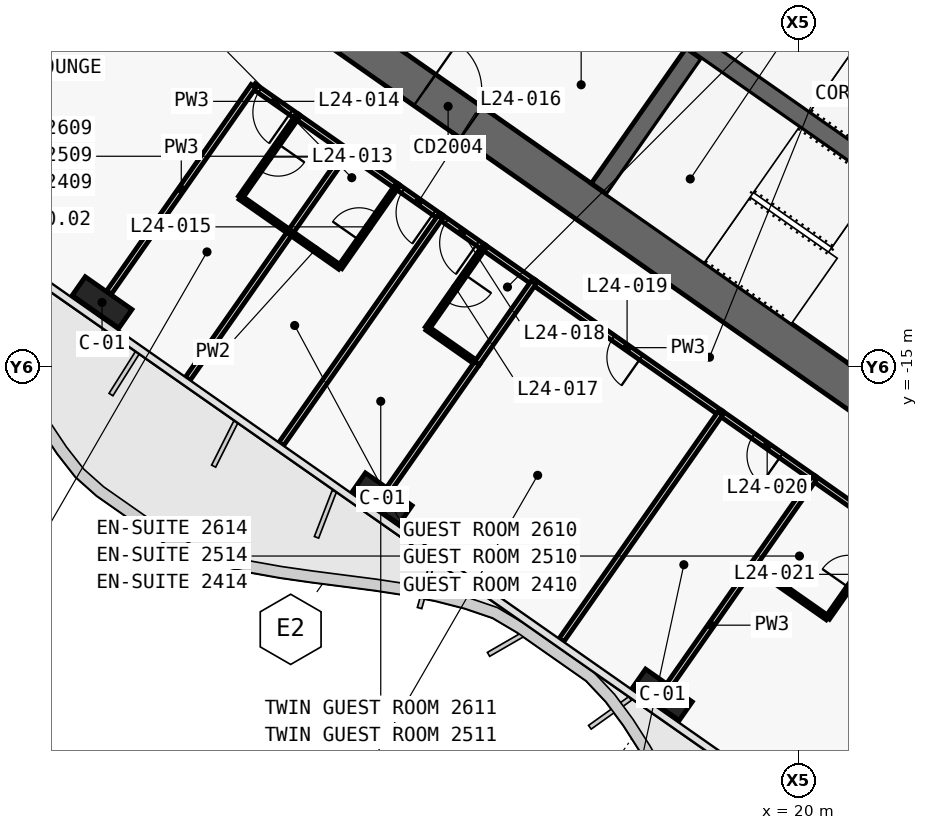
"""IFC4 building model, lengths in metres.
Left out: names, types, materials, properties, quantities, classifications, styles, units other than length and angle.
Written with IfcOpenShell. Run it as: python <this file> out.ifc"""

import sys

from ifc_helpers import new_model, si_unit, direction, frame, frame_2d, origin, origin_2d, place, context, subcontext, project, spatial, polyline, rectangle, outline, extrude, element, fill, save


model = new_model("IFC4")
c1 = context("Model", 3, precision=1e-05, world=origin(), true_north=direction((0.0, 1.0)))
c2 = subcontext(c1, "Body", "Model", "MODEL_VIEW")
j1 = project(units=[si_unit("LENGTHUNIT", "METRE"), si_unit("PLANEANGLEUNIT", "RADIAN")], contexts=[c1])
p1 = place(None, origin())
s1 = spatial("IfcSite", under=j1, at=p1, CompositionType="ELEMENT")
p2 = place(p1, origin())
s2 = spatial("IfcBuilding", under=s1, at=p2, CompositionType="ELEMENT")
p3 = place(p2, frame((0.0, 0.0, 112.1)))
s3 = spatial("IfcBuildingStorey", under=s2, at=p3, CompositionType="ELEMENT", Elevation=112.1)
p4 = place(p3, frame((-0.037, 11.867, 0.0), z_axis=(0.0, 0.0, 1.0), x_axis=(0.819155306259, -0.573571777746, 0.0)))
e1 = element("IfcWall", 1, at=p4, inside=s3, PredefinedType="SHEAR", context=c2, shape_type="SweptSolid", body=[
    extrude(outline(polyline([(33.837, 0.5), (0.0, 0.5), (0.7, -0.5), (33.837, -0.5), (33.837, 0.5)])), origin(), (0.0, 0.0, 1.0), 3.6),
])
p5 = place(p3, frame((-0.037, -0.585, 0.0), z_axis=(0.0, 0.0, 1.0), x_axis=(0.819157152511, -0.573569140985, 0.0)))
e2 = element("IfcWall", 2, at=p5, inside=s3, PredefinedType="SHEAR", context=c2, shape_type="SweptSolid", body=[
    extrude(outline(polyline([(26.695, 0.5), (0.0, 0.5), (0.7, -0.5), (26.695, -0.5), (26.695, 0.5)])), origin(), (0.0, 0.0, 1.0), 3.6),
])
p6 = place(p5, frame((6.695, 0.0, 0.0)))
e3 = element("IfcOpeningElement", 3, at=p6, cuts=e2, PredefinedType="OPENING", context=c2, shape_type="SweptSolid", body=[
    extrude(rectangle(XDim=1.5, YDim=2.1, at=frame_2d((0.75, 1.05))), frame((0.0, 0.51, 0.0), z_axis=(0.0, -1.0, 0.0), x_axis=(1.0, 0.0, 0.0)), (0.0, 0.0, 1.0), 1.02),
])
p7 = place(p5, frame((12.445, 0.0, 0.0)))
e4 = element("IfcOpeningElement", 4, at=p7, cuts=e2, PredefinedType="OPENING", context=c2, shape_type="SweptSolid", body=[
    extrude(rectangle(XDim=1.5, YDim=2.1, at=frame_2d((0.75, 1.05))), frame((0.0, 0.51, 0.0), z_axis=(0.0, -1.0, 0.0), x_axis=(1.0, 0.0, 0.0)), (0.0, 0.0, 1.0), 1.02),
])
p8 = place(p3, frame((14.745, -10.324, 0.0), z_axis=(0.0, 0.0, 1.0), x_axis=(0.57356780395, 0.819158088694, 0.0)))
e5 = element("IfcWall", 5, at=p8, inside=s3, PredefinedType="SHEAR", context=c2, shape_type="SweptSolid", body=[
    extrude(outline(polyline([(0.0, 0.25), (0.0, -0.25), (4.35, -0.25), (4.35, 0.25), (0.0, 0.25)])), origin(), (0.0, 0.0, 1.0), 3.6),
])
p9 = place(p3, frame((2.638, 3.768, 0.0), z_axis=(0.0, 0.0, 1.0), x_axis=(0.819148977158, -0.573580816643, 0.0)))
e6 = element("IfcWall", 6, at=p9, inside=s3, PredefinedType="SHEAR", context=c2, shape_type="SweptSolid", body=[
    extrude(outline(polyline([(0.0, 0.25), (0.0, -0.25), (26.0, -0.25), (26.0, 0.25), (0.0, 0.25)])), origin(), (0.0, 0.0, 1.0), 3.6),
])
p10 = place(p9, frame((9.637, 0.0, 0.0)))
e7 = element("IfcOpeningElement", 7, at=p10, cuts=e6, PredefinedType="OPENING", context=c2, shape_type="SweptSolid", body=[
    extrude(rectangle(XDim=1.2, YDim=2.1, at=frame_2d((0.6, 1.05))), frame((0.0, 0.26, 0.0), z_axis=(0.0, -1.0, 0.0), x_axis=(1.0, 0.0, 0.0)), (0.0, 0.0, 1.0), 0.52),
])
p11 = place(p9, frame((11.812, 0.0, 0.0)))
e8 = element("IfcOpeningElement", 8, at=p11, cuts=e6, PredefinedType="OPENING", context=c2, shape_type="SweptSolid", body=[
    extrude(rectangle(XDim=1.2, YDim=2.1, at=frame_2d((0.6, 1.05))), frame((0.0, 0.26, 0.0), z_axis=(0.0, -1.0, 0.0), x_axis=(1.0, 0.0, 0.0)), (0.0, 0.0, 1.0), 0.52),
])
p12 = place(p9, frame((13.988, 0.0, 0.0)))
e9 = element("IfcOpeningElement", 9, at=p12, cuts=e6, PredefinedType="OPENING", context=c2, shape_type="SweptSolid", body=[
    extrude(rectangle(XDim=1.2, YDim=2.1, at=frame_2d((0.6, 1.05))), frame((0.0, 0.26, 0.0), z_axis=(0.0, -1.0, 0.0), x_axis=(1.0, 0.0, 0.0)), (0.0, 0.0, 1.0), 0.52),
])
p13 = place(p9, frame((16.262, 0.0, 0.0)))
e10 = element("IfcOpeningElement", 10, at=p13, cuts=e6, PredefinedType="OPENING", context=c2, shape_type="SweptSolid", body=[
    extrude(rectangle(XDim=1.0, YDim=2.1, at=frame_2d((0.5, 1.05))), frame((0.0, 0.26, 0.0), z_axis=(0.0, -1.0, 0.0), x_axis=(1.0, 0.0, 0.0)), (0.0, 0.0, 1.0), 0.52),
])
for number, where, z_axis, x_axis in (
    (11, (1.665, -13.313, 0.0), (0.0, 0.0, 1.0), (0.819, -0.574, 0.0)),
    (12, (9.038, -18.475, 0.0), (0.0, 0.0, 1.0), (0.819, -0.574, 0.0)),
    (13, (16.41, -23.637, 0.0), (0.0, 0.0, 1.0), (0.819, -0.574, 0.0)),
):
    element("IfcColumn", number, at=place(p3, frame(where, z_axis=z_axis, x_axis=x_axis)), inside=s3, PredefinedType="COLUMN", context=c2, shape_type="SweptSolid", body=[
        extrude(rectangle(XDim=1.5, YDim=0.6, at=origin_2d()), origin(), (0.0, 0.0, 1.0), 3.6),
    ])
p14 = place(p3, frame((6.799, -8.423, 0.0), z_axis=(0.0, 0.0, 1.0), x_axis=(-0.819207359301, 0.573497430219, 0.0)))
e14 = element("IfcWall", 14, at=p14, inside=s3, PredefinedType="PARTITIONING", context=c2, shape_type="SweptSolid", body=[
    extrude(rectangle(XDim=1.401, YDim=0.15, at=frame_2d((0.7, 0.0))), origin(), (0.0, 0.0, 1.0), 2.6),
])
p15 = place(p14, frame((0.201, 0.0, 0.0)))
e15 = element("IfcOpeningElement", 15, at=p15, cuts=e14, PredefinedType="OPENING", context=c2, shape_type="SweptSolid", body=[
    extrude(rectangle(XDim=1.0, YDim=2.1, at=frame_2d((0.5, 1.05))), frame((0.0, 0.085, 0.0), z_axis=(0.0, -1.0, 0.0), x_axis=(1.0, 0.0, 0.0)), (0.0, 0.0, 1.0), 0.17),
])
p16 = place(p3, frame((8.111, -9.342, 0.0), z_axis=(0.0, 0.0, 1.0), x_axis=(-0.8190674132, 0.573697283098, 0.0)))
e16 = element("IfcWall", 16, at=p16, inside=s3, PredefinedType="PARTITIONING", context=c2, shape_type="SweptSolid", body=[
    extrude(rectangle(XDim=1.604, YDim=0.15, at=frame_2d((0.802, 0.0))), origin(), (0.0, 0.0, 1.0), 3.32),
])
p17 = place(p3, frame((10.568, -11.062, 0.0), z_axis=(0.0, 0.0, 1.0), x_axis=(-0.81914197737, 0.573590813132, 0.0)))
e17 = element("IfcWall", 17, at=p17, inside=s3, PredefinedType="PARTITIONING", context=c2, shape_type="SweptSolid", body=[
    extrude(rectangle(XDim=1.403, YDim=0.15, at=frame_2d((0.701, 0.0))), origin(), (0.0, 0.0, 1.0), 3.32),
])
p18 = place(p17, frame((0.202, 0.0, 0.0)))
e18 = element("IfcOpeningElement", 18, at=p18, cuts=e17, PredefinedType="OPENING", context=c2, shape_type="SweptSolid", body=[
    extrude(rectangle(XDim=1.0, YDim=2.1, at=frame_2d((0.5, 1.05))), frame((0.0, 0.085, 0.0), z_axis=(0.0, -1.0, 0.0), x_axis=(1.0, 0.0, 0.0)), (0.0, 0.0, 1.0), 0.17),
])
p19 = place(p3, frame((9.421, -10.259, 0.0), z_axis=(0.0, 0.0, 1.0), x_axis=(-0.819117502046, 0.573625764625, 0.0)))
e19 = element("IfcWall", 19, at=p19, inside=s3, PredefinedType="PARTITIONING", context=c2, shape_type="SweptSolid", body=[
    extrude(rectangle(XDim=1.604, YDim=0.15, at=frame_2d((0.802, 0.0))), origin(), (0.0, 0.0, 1.0), 3.32),
])
p20 = place(p3, frame((11.714, -11.865, 0.0), z_axis=(0.0, 0.0, 1.0), x_axis=(-0.81914197737, 0.573590813132, 0.0)))
e20 = element("IfcWall", 20, at=p20, inside=s3, PredefinedType="PARTITIONING", context=c2, shape_type="SweptSolid", body=[
    extrude(rectangle(XDim=1.403, YDim=0.15, at=frame_2d((0.701, 0.0))), origin(), (0.0, 0.0, 1.0), 3.32),
])
p21 = place(p20, frame((0.201, 0.0, 0.0)))
e21 = element("IfcOpeningElement", 21, at=p21, cuts=e20, PredefinedType="OPENING", context=c2, shape_type="SweptSolid", body=[
    extrude(rectangle(XDim=1.0, YDim=2.1, at=frame_2d((0.5, 1.05))), frame((0.0, 0.085, 0.0), z_axis=(0.0, -1.0, 0.0), x_axis=(1.0, 0.0, 0.0)), (0.0, 0.0, 1.0), 0.17),
])
p22 = place(p3, frame((13.026, -12.783, 0.0), z_axis=(0.0, 0.0, 1.0), x_axis=(-0.819189013667, 0.573523634986, 0.0)))
e22 = element("IfcWall", 22, at=p22, inside=s3, PredefinedType="PARTITIONING", context=c2, shape_type="SweptSolid", body=[
    extrude(rectangle(XDim=1.604, YDim=0.15, at=frame_2d((0.802, 0.0))), origin(), (0.0, 0.0, 1.0), 2.6),
])
p23 = place(p3, frame((17.941, -16.224, 0.0), z_axis=(0.0, 0.0, 1.0), x_axis=(-0.819165052243, 0.573557858619, 0.0)))
e23 = element("IfcWall", 23, at=p23, inside=s3, PredefinedType="PARTITIONING", context=c2, shape_type="SweptSolid", body=[
    extrude(rectangle(XDim=6.004, YDim=0.15, at=frame_2d((3.002, 0.0))), origin(), (0.0, 0.0, 1.0), 2.6),
])
p24 = place(p23, frame((2.552, 0.0, 0.0)))
e24 = element("IfcOpeningElement", 24, at=p24, cuts=e23, PredefinedType="OPENING", context=c2, shape_type="SweptSolid", body=[
    extrude(rectangle(XDim=0.9, YDim=2.1, at=frame_2d((0.45, 1.05))), frame((0.0, 0.085, 0.0), z_axis=(0.0, -1.0, 0.0), x_axis=(1.0, 0.0, 0.0)), (0.0, 0.0, 1.0), 0.17),
])
p25 = place(p3, frame((20.398, -17.945, 0.0), z_axis=(0.0, 0.0, 1.0), x_axis=(-0.819128818764, 0.573609604409, 0.0)))
e25 = element("IfcWall", 25, at=p25, inside=s3, PredefinedType="PARTITIONING", context=c2, shape_type="SweptSolid", body=[
    extrude(rectangle(XDim=3.004, YDim=0.15, at=frame_2d((1.502, 0.0))), origin(), (0.0, 0.0, 1.0), 2.6),
])
p26 = place(p25, frame((1.052, 0.0, 0.0)))
e26 = element("IfcOpeningElement", 26, at=p26, cuts=e25, PredefinedType="OPENING", context=c2, shape_type="SweptSolid", body=[
    extrude(rectangle(XDim=0.9, YDim=2.1, at=frame_2d((0.45, 1.05))), frame((0.0, 0.085, 0.0), z_axis=(0.0, -1.0, 0.0), x_axis=(1.0, 0.0, 0.0)), (0.0, 0.0, 1.0), 0.17),
])
p27 = place(p3, frame((22.364, -19.322, 0.0), z_axis=(0.0, 0.0, 1.0), x_axis=(-0.819146032251, 0.573585022335, 0.0)))
e27 = element("IfcWall", 27, at=p27, inside=s3, PredefinedType="PARTITIONING", context=c2, shape_type="SweptSolid", body=[
    extrude(rectangle(XDim=2.404, YDim=0.15, at=frame_2d((1.202, 0.0))), origin(), (0.0, 0.0, 1.0), 2.6),
])
p28 = place(p3, frame((6.798, -8.422, 0.0), z_axis=(0.0, 0.0, 1.0), x_axis=(-0.573537965655, -0.819178980414, 0.0)))
e28 = element("IfcWall", 28, at=p28, inside=s3, PredefinedType="PARTITIONING", context=c2, shape_type="SweptSolid", body=[
    extrude(rectangle(XDim=2.6, YDim=0.12, at=frame_2d((1.3, 0.0))), origin(), (0.0, 0.0, 1.0), 3.32),
])
p29 = place(p28, frame((0.875, 0.0, 0.0)))
e29 = element("IfcOpeningElement", 29, at=p29, cuts=e28, PredefinedType="OPENING", context=c2, shape_type="SweptSolid", body=[
    extrude(rectangle(XDim=0.85, YDim=2.05, at=frame_2d((0.425, 1.025))), frame((0.0, 0.07, 0.0), z_axis=(0.0, -1.0, 0.0), x_axis=(1.0, 0.0, 0.0)), (0.0, 0.0, 1.0), 0.14),
])
p30 = place(p3, frame((5.307, -10.553, 0.0), z_axis=(0.0, 0.0, 1.0), x_axis=(0.819131543282, -0.57360571371, 0.0)))
e30 = element("IfcWall", 30, at=p30, inside=s3, PredefinedType="PARTITIONING", context=c2, shape_type="SweptSolid", body=[
    extrude(rectangle(XDim=1.6, YDim=0.12, at=frame_2d((0.8, 0.0))), origin(), (0.0, 0.0, 1.0), 3.32),
])
p31 = place(p3, frame((6.617, -11.471, 0.0), z_axis=(0.0, 0.0, 1.0), x_axis=(-0.573535567792, -0.819180659243, 0.0)))
e31 = element("IfcWall", 31, at=p31, inside=s3, PredefinedType="PARTITIONING", context=c2, shape_type="SweptSolid", body=[
    extrude(rectangle(XDim=4.699, YDim=0.15, at=frame_2d((2.35, 0.0))), origin(), (0.0, 0.0, 1.0), 2.5),
])
p32 = place(p3, frame((1.849, -13.051, 0.0), z_axis=(0.0, 0.0, 1.0), x_axis=(0.57357355307, 0.819154063177, 0.0)))
e32 = element("IfcWall", 32, at=p32, inside=s3, PredefinedType="PARTITIONING", context=c2, shape_type="SweptSolid", body=[
    extrude(rectangle(XDim=6.63, YDim=0.15, at=frame_2d((3.315, 0.0))), origin(), (0.0, 0.0, 1.0), 2.6),
])
p33 = place(p3, frame((8.109, -9.34, 0.0), z_axis=(0.0, 0.0, 1.0), x_axis=(-0.573537965655, -0.819178980414, 0.0)))
e33 = element("IfcWall", 33, at=p33, inside=s3, PredefinedType="PARTITIONING", context=c2, shape_type="SweptSolid", body=[
    extrude(rectangle(XDim=2.6, YDim=0.15, at=frame_2d((1.3, 0.0))), origin(), (0.0, 0.0, 1.0), 3.32),
])
p34 = place(p3, frame((6.617, -11.471, 0.0), z_axis=(0.0, 0.0, 1.0), x_axis=(0.81918174131, -0.573534022273, 0.0)))
e34 = element("IfcWall", 34, at=p34, inside=s3, PredefinedType="PARTITIONING", context=c2, shape_type="SweptSolid", body=[
    extrude(rectangle(XDim=1.6, YDim=0.12, at=frame_2d((0.8, 0.0))), origin(), (0.0, 0.0, 1.0), 3.32),
])
p35 = place(p3, frame((7.929, -12.388, 0.0), z_axis=(0.0, 0.0, 1.0), x_axis=(0.573645091666, 0.819103967032, 0.0)))
e35 = element("IfcWall", 35, at=p35, inside=s3, PredefinedType="PARTITIONING", context=c2, shape_type="SweptSolid", body=[
    extrude(rectangle(XDim=2.6, YDim=0.12, at=frame_2d((1.3, 0.0))), origin(), (0.0, 0.0, 1.0), 3.32),
])
p36 = place(p35, frame((0.875, 0.0, 0.0)))
e36 = element("IfcOpeningElement", 36, at=p36, cuts=e35, PredefinedType="OPENING", context=c2, shape_type="SweptSolid", body=[
    extrude(rectangle(XDim=0.85, YDim=2.05, at=frame_2d((0.425, 1.025))), frame((0.0, 0.07, 0.0), z_axis=(0.0, -1.0, 0.0), x_axis=(1.0, 0.0, 0.0)), (0.0, 0.0, 1.0), 0.14),
])
p37 = place(p3, frame((10.567, -11.061, 0.0), z_axis=(0.0, 0.0, 1.0), x_axis=(-0.573579051994, -0.81915021279, 0.0)))
e37 = element("IfcWall", 37, at=p37, inside=s3, PredefinedType="PARTITIONING", context=c2, shape_type="SweptSolid", body=[
    extrude(rectangle(XDim=7.3, YDim=0.15, at=frame_2d((3.65, 0.0))), origin(), (0.0, 0.0, 1.0), 2.5),
])
p38 = place(p3, frame((11.712, -11.864, 0.0), z_axis=(0.0, 0.0, 1.0), x_axis=(-0.573537965655, -0.819178980414, 0.0)))
e38 = element("IfcWall", 38, at=p38, inside=s3, PredefinedType="PARTITIONING", context=c2, shape_type="SweptSolid", body=[
    extrude(rectangle(XDim=2.6, YDim=0.12, at=frame_2d((1.3, 0.0))), origin(), (0.0, 0.0, 1.0), 3.32),
])
p39 = place(p38, frame((0.875, 0.0, 0.0)))
e39 = element("IfcOpeningElement", 39, at=p39, cuts=e38, PredefinedType="OPENING", context=c2, shape_type="SweptSolid", body=[
    extrude(rectangle(XDim=0.85, YDim=2.05, at=frame_2d((0.425, 1.025))), frame((0.0, 0.07, 0.0), z_axis=(0.0, -1.0, 0.0), x_axis=(1.0, 0.0, 0.0)), (0.0, 0.0, 1.0), 0.14),
])
p40 = place(p3, frame((10.221, -13.995, 0.0), z_axis=(0.0, 0.0, 1.0), x_axis=(0.819131543282, -0.57360571371, 0.0)))
e40 = element("IfcWall", 40, at=p40, inside=s3, PredefinedType="PARTITIONING", context=c2, shape_type="SweptSolid", body=[
    extrude(rectangle(XDim=1.6, YDim=0.12, at=frame_2d((0.8, 0.0))), origin(), (0.0, 0.0, 1.0), 2.6),
])
p41 = place(p3, frame((11.532, -14.912, 0.0), z_axis=(0.0, 0.0, 1.0), x_axis=(-0.573531477532, -0.819183522954, 0.0)))
e41 = element("IfcWall", 41, at=p41, inside=s3, PredefinedType="PARTITIONING", context=c2, shape_type="SweptSolid", body=[
    extrude(rectangle(XDim=4.029, YDim=0.15, at=frame_2d((2.015, 0.0))), origin(), (0.0, 0.0, 1.0), 2.6),
])
p42 = place(p3, frame((13.024, -12.782, 0.0), z_axis=(0.0, 0.0, 1.0), x_axis=(-0.573537965655, -0.819178980414, 0.0)))
e42 = element("IfcWall", 42, at=p42, inside=s3, PredefinedType="PARTITIONING", context=c2, shape_type="SweptSolid", body=[
    extrude(rectangle(XDim=2.6, YDim=0.15, at=frame_2d((1.3, 0.0))), origin(), (0.0, 0.0, 1.0), 2.6),
])
p43 = place(p3, frame((17.939, -16.223, 0.0), z_axis=(0.0, 0.0, 1.0), x_axis=(-0.573594765376, -0.819139209862, 0.0)))
e43 = element("IfcWall", 43, at=p43, inside=s3, PredefinedType="PARTITIONING", context=c2, shape_type="SweptSolid", body=[
    extrude(rectangle(XDim=7.3, YDim=0.15, at=frame_2d((3.65, 0.0))), origin(), (0.0, 0.0, 1.0), 2.5),
])
p44 = place(p3, frame((18.791, -20.237, 0.0), z_axis=(0.0, 0.0, 1.0), x_axis=(-0.57359919792, -0.819136105995, 0.0)))
e44 = element("IfcWall", 44, at=p44, inside=s3, PredefinedType="PARTITIONING", context=c2, shape_type="SweptSolid", body=[
    extrude(rectangle(XDim=3.831, YDim=0.15, at=frame_2d((1.916, 0.0))), origin(), (0.0, 0.0, 1.0), 2.6),
])
p45 = place(p3, frame((20.396, -17.944, 0.0), z_axis=(0.0, 0.0, 1.0), x_axis=(-0.573596837309, -0.819137759006, 0.0)))
e45 = element("IfcWall", 45, at=p45, inside=s3, PredefinedType="PARTITIONING", context=c2, shape_type="SweptSolid", body=[
    extrude(rectangle(XDim=2.802, YDim=0.15, at=frame_2d((1.401, 0.0))), origin(), (0.0, 0.0, 1.0), 2.6),
])
p46 = place(p3, frame((18.79, -20.239, 0.0), z_axis=(0.0, 0.0, 1.0), x_axis=(0.819188907105, -0.573523787192, 0.0)))
e46 = element("IfcWall", 46, at=p46, inside=s3, PredefinedType="PARTITIONING", context=c2, shape_type="SweptSolid", body=[
    extrude(rectangle(XDim=2.4, YDim=0.12, at=frame_2d((1.2, 0.0))), origin(), (0.0, 0.0, 1.0), 2.6),
])
p47 = place(p3, frame((20.757, -21.615, 0.0), z_axis=(0.0, 0.0, 1.0), x_axis=(0.57364959175, 0.819100815459, 0.0)))
e47 = element("IfcWall", 47, at=p47, inside=s3, PredefinedType="PARTITIONING", context=c2, shape_type="SweptSolid", body=[
    extrude(rectangle(XDim=2.8, YDim=0.12, at=frame_2d((1.4, 0.0))), origin(), (0.0, 0.0, 1.0), 3.32),
])
p48 = place(p47, frame((0.975, 0.0, 0.0)))
e48 = element("IfcOpeningElement", 48, at=p48, cuts=e47, PredefinedType="OPENING", context=c2, shape_type="SweptSolid", body=[
    extrude(rectangle(XDim=0.85, YDim=2.05, at=frame_2d((0.425, 1.025))), frame((0.0, 0.07, 0.0), z_axis=(0.0, -1.0, 0.0), x_axis=(1.0, 0.0, 0.0)), (0.0, 0.0, 1.0), 0.14),
])
p49 = place(p7, origin())
e49 = element("IfcDoor", 49, at=p49, inside=s3, OperationType="DOUBLE_DOOR_SINGLE_SWING", PredefinedType="DOOR", context=c2, shape_type="SweptSolid", body=[
    extrude(rectangle(XDim=1.5, YDim=2.1, at=frame_2d((0.75, 1.05))), frame((0.0, 0.025, 0.0), z_axis=(0.0, -1.0, 0.0), x_axis=(1.0, 0.0, 0.0)), (0.0, 0.0, 1.0), 0.05),
])
fill(e4, e49)
p50 = place(p29, origin())
e50 = element("IfcDoor", 50, at=p50, inside=s3, OperationType="SINGLE_SWING_RIGHT", PredefinedType="DOOR", context=c2, shape_type="SweptSolid", body=[
    extrude(rectangle(XDim=0.85, YDim=2.05, at=frame_2d((0.425, 1.025))), frame((0.0, 0.025, 0.0), z_axis=(0.0, -1.0, 0.0), x_axis=(1.0, 0.0, 0.0)), (0.0, 0.0, 1.0), 0.05),
])
fill(e29, e50)
p51 = place(p15, origin())
e51 = element("IfcDoor", 51, at=p51, inside=s3, OperationType="SINGLE_SWING_LEFT", PredefinedType="DOOR", context=c2, shape_type="SweptSolid", body=[
    extrude(rectangle(XDim=1.0, YDim=2.1, at=frame_2d((0.5, 1.05))), frame((0.0, 0.025, 0.0), z_axis=(0.0, -1.0, 0.0), x_axis=(1.0, 0.0, 0.0)), (0.0, 0.0, 1.0), 0.05),
])
fill(e15, e51)
p52 = place(p36, origin())
e52 = element("IfcDoor", 52, at=p52, inside=s3, OperationType="SINGLE_SWING_RIGHT", PredefinedType="DOOR", context=c2, shape_type="SweptSolid", body=[
    extrude(rectangle(XDim=0.85, YDim=2.05, at=frame_2d((0.425, 1.025))), frame((0.0, 0.025, 0.0), z_axis=(0.0, -1.0, 0.0), x_axis=(1.0, 0.0, 0.0)), (0.0, 0.0, 1.0), 0.05),
])
fill(e36, e52)
p53 = place(p18, origin())
e53 = element("IfcDoor", 53, at=p53, inside=s3, OperationType="SINGLE_SWING_LEFT", PredefinedType="DOOR", context=c2, shape_type="SweptSolid", body=[
    extrude(rectangle(XDim=1.0, YDim=2.1, at=frame_2d((0.5, 1.05))), frame((0.0, 0.025, 0.0), z_axis=(0.0, -1.0, 0.0), x_axis=(1.0, 0.0, 0.0)), (0.0, 0.0, 1.0), 0.05),
])
fill(e18, e53)
p54 = place(p39, origin())
e54 = element("IfcDoor", 54, at=p54, inside=s3, OperationType="SINGLE_SWING_RIGHT", PredefinedType="DOOR", context=c2, shape_type="SweptSolid", body=[
    extrude(rectangle(XDim=0.85, YDim=2.05, at=frame_2d((0.425, 1.025))), frame((0.0, 0.025, 0.0), z_axis=(0.0, -1.0, 0.0), x_axis=(1.0, 0.0, 0.0)), (0.0, 0.0, 1.0), 0.05),
])
fill(e39, e54)
p55 = place(p21, origin())
e55 = element("IfcDoor", 55, at=p55, inside=s3, OperationType="SINGLE_SWING_LEFT", PredefinedType="DOOR", context=c2, shape_type="SweptSolid", body=[
    extrude(rectangle(XDim=1.0, YDim=2.1, at=frame_2d((0.5, 1.05))), frame((0.0, 0.025, 0.0), z_axis=(0.0, -1.0, 0.0), x_axis=(1.0, 0.0, 0.0)), (0.0, 0.0, 1.0), 0.05),
])
fill(e21, e55)
p56 = place(p24, origin())
e56 = element("IfcDoor", 56, at=p56, inside=s3, OperationType="SINGLE_SWING_LEFT", PredefinedType="DOOR", context=c2, shape_type="SweptSolid", body=[
    extrude(rectangle(XDim=0.9, YDim=2.1, at=frame_2d((0.45, 1.05))), frame((0.0, 0.025, 0.0), z_axis=(0.0, -1.0, 0.0), x_axis=(1.0, 0.0, 0.0)), (0.0, 0.0, 1.0), 0.05),
])
fill(e24, e56)
p57 = place(p26, origin())
e57 = element("IfcDoor", 57, at=p57, inside=s3, OperationType="SINGLE_SWING_LEFT", PredefinedType="DOOR", context=c2, shape_type="SweptSolid", body=[
    extrude(rectangle(XDim=0.9, YDim=2.1, at=frame_2d((0.45, 1.05))), frame((0.0, 0.025, 0.0), z_axis=(0.0, -1.0, 0.0), x_axis=(1.0, 0.0, 0.0)), (0.0, 0.0, 1.0), 0.05),
])
fill(e26, e57)
save(model, sys.argv[1])
